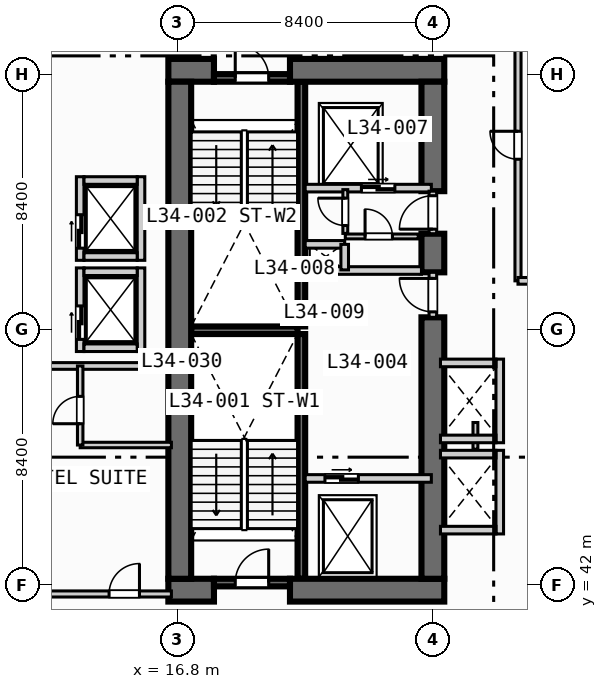
"""IFC4 building model, lengths in metres.
Left out: names, types, materials, properties, quantities, classifications, styles, units other than length and angle.
Written with IfcOpenShell. Run it as: python <this file> out.ifc"""

import sys

from ifc_helpers import new_model, si_unit, direction, frame, frame_2d, origin, place, context, subcontext, project, spatial, rectangle, extrude, element, fill, save


model = new_model("IFC4")
c1 = context("Model", 3, precision=1e-05, world=origin(), true_north=direction((0.0, 1.0)))
c2 = subcontext(c1, "Body", "Model", "MODEL_VIEW")
j1 = project(units=[si_unit("LENGTHUNIT", "METRE"), si_unit("PLANEANGLEUNIT", "RADIAN")], contexts=[c1])
p1 = place(None, origin())
s1 = spatial("IfcSite", under=j1, at=p1, CompositionType="ELEMENT")
p2 = place(p1, origin())
s2 = spatial("IfcBuilding", under=s1, at=p2, CompositionType="ELEMENT")
p3 = place(p2, frame((0.0, 0.0, 141.8)))
s3 = spatial("IfcBuildingStorey", under=s2, at=p3, CompositionType="ELEMENT", Elevation=141.8)
for number, where, z_axis, x_axis in (
    (1, (20.875, 42.2, 0.0), (0.0, 0.0, 1.0), (0.0, 1.0, 0.0)),
    (2, (20.875, 50.5, 0.0), (0.0, 0.0, 1.0), (0.0, 1.0, 0.0)),
):
    element("IfcWall", number, at=place(p3, frame(where, z_axis=z_axis, x_axis=x_axis)), inside=s3, PredefinedType="SOLIDWALL", context=c2, shape_type="SweptSolid", body=[
        extrude(rectangle(XDim=8.05, YDim=0.25, at=frame_2d((4.025, 0.0))), origin(), (0.0, 0.0, 1.0), 3.55),
    ])
p4 = place(p3, frame((17.25, 50.375, 0.0), z_axis=(0.0, 0.0, 1.0), x_axis=(1.0, 0.0, 0.0)))
e3 = element("IfcWall", 3, at=p4, inside=s3, PredefinedType="SOLIDWALL", context=c2, shape_type="SweptSolid", body=[
    extrude(rectangle(XDim=3.5, YDim=0.25, at=frame_2d((1.75, 0.0))), origin(), (0.0, 0.0, 1.0), 3.55),
])
p5 = place(p3, frame((16.5, 41.825, 0.0), z_axis=(0.0, 0.0, 1.0), x_axis=(1.0, 0.0, 0.0)))
e4 = element("IfcWall", 4, at=p5, inside=s3, PredefinedType="SHEAR", context=c2, shape_type="SweptSolid", body=[
    extrude(rectangle(XDim=1.5, YDim=0.75, at=frame_2d((0.75, 0.0))), origin(), (0.0, 0.0, 1.0), 3.55),
])
p6 = place(p3, frame((20.5, 41.825, 0.0), z_axis=(0.0, 0.0, 1.0), x_axis=(1.0, 0.0, 0.0)))
e5 = element("IfcWall", 5, at=p6, inside=s3, PredefinedType="SHEAR", context=c2, shape_type="SweptSolid", body=[
    extrude(rectangle(XDim=5.075, YDim=0.75, at=frame_2d((2.538, 0.0))), origin(), (0.0, 0.0, 1.0), 3.55),
])
p7 = place(p3, frame((16.5, 58.925, 0.0), z_axis=(0.0, 0.0, 1.0), x_axis=(1.0, 0.0, 0.0)))
e6 = element("IfcWall", 6, at=p7, inside=s3, PredefinedType="SHEAR", context=c2, shape_type="SweptSolid", body=[
    extrude(rectangle(XDim=1.5, YDim=0.75, at=frame_2d((0.75, 0.0))), origin(), (0.0, 0.0, 1.0), 3.55),
])
p8 = place(p3, frame((20.5, 58.925, 0.0), z_axis=(0.0, 0.0, 1.0), x_axis=(1.0, 0.0, 0.0)))
e7 = element("IfcWall", 7, at=p8, inside=s3, PredefinedType="SHEAR", context=c2, shape_type="SweptSolid", body=[
    extrude(rectangle(XDim=5.075, YDim=0.75, at=frame_2d((2.538, 0.0))), origin(), (0.0, 0.0, 1.0), 3.55),
])
p9 = place(p3, frame((16.875, 42.2, 0.0), z_axis=(0.0, 0.0, 1.0), x_axis=(0.0, 1.0, 0.0)))
e8 = element("IfcWall", 8, at=p9, inside=s3, PredefinedType="SHEAR", context=c2, shape_type="SweptSolid", body=[
    extrude(rectangle(XDim=16.35, YDim=0.75, at=frame_2d((8.175, 0.0))), origin(), (0.0, 0.0, 1.0), 3.55),
])
p10 = place(p3, frame((25.2, 42.2, 0.0), z_axis=(0.0, 0.0, 1.0), x_axis=(0.0, 1.0, 0.0)))
e9 = element("IfcWall", 9, at=p10, inside=s3, PredefinedType="SHEAR", context=c2, shape_type="SweptSolid", body=[
    extrude(rectangle(XDim=8.6, YDim=0.75, at=frame_2d((4.3, 0.0))), origin(), (0.0, 0.0, 1.0), 3.55),
])
p11 = place(p3, frame((25.2, 52.28, 0.0), z_axis=(0.0, 0.0, 1.0), x_axis=(0.0, 1.0, 0.0)))
e10 = element("IfcWall", 10, at=p11, inside=s3, PredefinedType="SHEAR", context=c2, shape_type="SweptSolid", body=[
    extrude(rectangle(XDim=1.27, YDim=0.75, at=frame_2d((0.635, 0.0))), origin(), (0.0, 0.0, 1.0), 3.55),
])
p12 = place(p3, frame((25.2, 54.95, 0.0), z_axis=(0.0, 0.0, 1.0), x_axis=(0.0, 1.0, 0.0)))
e11 = element("IfcWall", 11, at=p12, inside=s3, PredefinedType="SHEAR", context=c2, shape_type="SweptSolid", body=[
    extrude(rectangle(XDim=3.6, YDim=0.75, at=frame_2d((1.8, 0.0))), origin(), (0.0, 0.0, 1.0), 3.55),
])
p13 = place(p3, frame((18.0, 42.075, 0.0), z_axis=(0.0, 0.0, 1.0), x_axis=(1.0, 0.0, 0.0)))
e12 = element("IfcWall", 12, at=p13, inside=s3, PredefinedType="SOLIDWALL", context=c2, shape_type="SweptSolid", body=[
    extrude(rectangle(XDim=2.5, YDim=0.25, at=frame_2d((1.25, 0.0))), origin(), (0.0, 0.0, 1.0), 3.55),
])
p14 = place(p13, frame((0.7, 0.0, 0.0)))
e13 = element("IfcOpeningElement", 13, at=p14, cuts=e12, PredefinedType="OPENING", context=c2, shape_type="SweptSolid", body=[
    extrude(rectangle(XDim=1.1, YDim=2.15, at=frame_2d((0.55, 1.075))), frame((0.0, 0.135, 0.0), z_axis=(0.0, -1.0, 0.0), x_axis=(1.0, 0.0, 0.0)), (0.0, 0.0, 1.0), 0.27),
])
p15 = place(p3, frame((18.0, 58.675, 0.0), z_axis=(0.0, 0.0, 1.0), x_axis=(1.0, 0.0, 0.0)))
e14 = element("IfcWall", 14, at=p15, inside=s3, PredefinedType="SOLIDWALL", context=c2, shape_type="SweptSolid", body=[
    extrude(rectangle(XDim=2.5, YDim=0.25, at=frame_2d((1.25, 0.0))), origin(), (0.0, 0.0, 1.0), 3.55),
])
p16 = place(p15, frame((0.7, 0.0, 0.0)))
e15 = element("IfcOpeningElement", 15, at=p16, cuts=e14, PredefinedType="OPENING", context=c2, shape_type="SweptSolid", body=[
    extrude(rectangle(XDim=1.1, YDim=2.15, at=frame_2d((0.55, 1.075))), frame((0.0, 0.135, 0.0), z_axis=(0.0, -1.0, 0.0), x_axis=(1.0, 0.0, 0.0)), (0.0, 0.0, 1.0), 0.27),
])
p17 = place(p3, frame((21.0, 45.5, 0.0), z_axis=(0.0, 0.0, 1.0), x_axis=(1.0, 0.0, 0.0)))
e16 = element("IfcWall", 16, at=p17, inside=s3, PredefinedType="SOLIDWALL", context=c2, shape_type="SweptSolid", body=[
    extrude(rectangle(XDim=4.15, YDim=0.25, at=frame_2d((2.075, 0.0))), origin(), (0.0, 0.0, 1.0), 3.55),
])
p18 = place(p17, frame((0.65, 0.0, 0.0)))
e17 = element("IfcOpeningElement", 17, at=p18, cuts=e16, PredefinedType="OPENING", context=c2, shape_type="SweptSolid", body=[
    extrude(rectangle(XDim=1.1, YDim=2.15, at=frame_2d((0.55, 1.075))), frame((0.0, 0.135, 0.0), z_axis=(0.0, -1.0, 0.0), x_axis=(1.0, 0.0, 0.0)), (0.0, 0.0, 1.0), 0.27),
])
p19 = place(p3, frame((25.2, 50.8, 0.0), z_axis=(0.0, 0.0, 1.0), x_axis=(0.0, 1.0, 0.0)))
e18 = element("IfcWall", 18, at=p19, inside=s3, PredefinedType="SOLIDWALL", context=c2, shape_type="SweptSolid", body=[
    extrude(rectangle(XDim=1.48, YDim=0.25, at=frame_2d((0.74, 0.0))), origin(), (0.0, 0.0, 1.0), 3.55),
])
p20 = place(p19, frame((0.18, 0.0, 0.0)))
e19 = element("IfcOpeningElement", 19, at=p20, cuts=e18, PredefinedType="OPENING", context=c2, shape_type="SweptSolid", body=[
    extrude(rectangle(XDim=1.1, YDim=2.15, at=frame_2d((0.55, 1.075))), frame((0.0, 0.135, 0.0), z_axis=(0.0, -1.0, 0.0), x_axis=(1.0, 0.0, 0.0)), (0.0, 0.0, 1.0), 0.27),
])
p21 = place(p3, frame((21.0, 52.34, 0.0), z_axis=(0.0, 0.0, 1.0), x_axis=(1.0, 0.0, 0.0)))
e20 = element("IfcWall", 20, at=p21, inside=s3, PredefinedType="SOLIDWALL", context=c2, shape_type="SweptSolid", body=[
    extrude(rectangle(XDim=3.825, YDim=0.25, at=frame_2d((1.913, 0.0))), origin(), (0.0, 0.0, 1.0), 3.55),
])
p22 = place(p3, frame((21.0, 55.05, 0.0), z_axis=(0.0, 0.0, 1.0), x_axis=(1.0, 0.0, 0.0)))
e21 = element("IfcWall", 21, at=p22, inside=s3, PredefinedType="SOLIDWALL", context=c2, shape_type="SweptSolid", body=[
    extrude(rectangle(XDim=4.15, YDim=0.25, at=frame_2d((2.075, 0.0))), origin(), (0.0, 0.0, 1.0), 3.55),
])
p23 = place(p22, frame((1.85, 0.0, 0.0)))
e22 = element("IfcOpeningElement", 22, at=p23, cuts=e21, PredefinedType="OPENING", context=c2, shape_type="SweptSolid", body=[
    extrude(rectangle(XDim=1.1, YDim=2.15, at=frame_2d((0.55, 1.075))), frame((0.0, 0.135, 0.0), z_axis=(0.0, -1.0, 0.0), x_axis=(1.0, 0.0, 0.0)), (0.0, 0.0, 1.0), 0.27),
])
p24 = place(p3, frame((25.2, 53.55, 0.0), z_axis=(0.0, 0.0, 1.0), x_axis=(0.0, 1.0, 0.0)))
e23 = element("IfcWall", 23, at=p24, inside=s3, PredefinedType="SOLIDWALL", context=c2, shape_type="SweptSolid", body=[
    extrude(rectangle(XDim=1.4, YDim=0.25, at=frame_2d((0.7, 0.0))), origin(), (0.0, 0.0, 1.0), 3.55),
])
p25 = place(p24, frame((0.15, 0.0, 0.0)))
e24 = element("IfcOpeningElement", 24, at=p25, cuts=e23, PredefinedType="OPENING", context=c2, shape_type="SweptSolid", body=[
    extrude(rectangle(XDim=1.1, YDim=2.15, at=frame_2d((0.55, 1.075))), frame((0.0, 0.135, 0.0), z_axis=(0.0, -1.0, 0.0), x_axis=(1.0, 0.0, 0.0)), (0.0, 0.0, 1.0), 0.27),
])
p26 = place(p3, frame((21.0, 53.2, 0.0), z_axis=(0.0, 0.0, 1.0), x_axis=(1.0, 0.0, 0.0)))
e25 = element("IfcWall", 25, at=p26, inside=s3, PredefinedType="SOLIDWALL", context=c2, shape_type="SweptSolid", body=[
    extrude(rectangle(XDim=1.3, YDim=0.25, at=frame_2d((0.65, 0.0))), origin(), (0.0, 0.0, 1.0), 3.55),
])
p27 = place(p3, frame((22.3, 52.36, 0.0), z_axis=(0.0, 0.0, 1.0), x_axis=(0.0, 1.0, 0.0)))
e26 = element("IfcWall", 26, at=p27, inside=s3, PredefinedType="SOLIDWALL", context=c2, shape_type="SweptSolid", body=[
    extrude(rectangle(XDim=0.84, YDim=0.25, at=frame_2d((0.42, 0.0))), origin(), (0.0, 0.0, 1.0), 3.55),
])
p28 = place(p3, frame((22.32, 53.56, 0.0), z_axis=(0.0, 0.0, 1.0), x_axis=(0.0, 1.0, 0.0)))
e27 = element("IfcWall", 27, at=p28, inside=s3, PredefinedType="PARTITIONING", context=c2, shape_type="SweptSolid", body=[
    extrude(rectangle(XDim=1.44, YDim=0.16, at=frame_2d((0.72, 0.0))), origin(), (0.0, 0.0, 1.0), 3.55),
])
p29 = place(p28, frame((0.26, 0.0, 0.0)))
e28 = element("IfcOpeningElement", 28, at=p29, cuts=e27, PredefinedType="OPENING", context=c2, shape_type="SweptSolid", body=[
    extrude(rectangle(XDim=0.9, YDim=2.1, at=frame_2d((0.45, 1.05))), frame((0.0, 0.09, 0.0), z_axis=(0.0, -1.0, 0.0), x_axis=(1.0, 0.0, 0.0)), (0.0, 0.0, 1.0), 0.18),
])
p30 = place(p3, frame((22.32, 53.46, 0.0), z_axis=(0.0, 0.0, 1.0), x_axis=(1.0, 0.0, 0.0)))
e29 = element("IfcWall", 29, at=p30, inside=s3, PredefinedType="PARTITIONING", context=c2, shape_type="SweptSolid", body=[
    extrude(rectangle(XDim=2.4, YDim=0.16, at=frame_2d((1.2, 0.0))), origin(), (0.0, 0.0, 1.0), 3.55),
])
p31 = place(p30, frame((0.65, 0.0, 0.0)))
e30 = element("IfcOpeningElement", 30, at=p31, cuts=e29, PredefinedType="OPENING", context=c2, shape_type="SweptSolid", body=[
    extrude(rectangle(XDim=0.9, YDim=2.1, at=frame_2d((0.45, 1.05))), frame((0.0, 0.09, 0.0), z_axis=(0.0, -1.0, 0.0), x_axis=(1.0, 0.0, 0.0)), (0.0, 0.0, 1.0), 0.18),
])
p32 = place(p3, frame((13.6, 49.675, 0.0), z_axis=(0.0, 0.0, 1.0), x_axis=(0.0, 1.0, 0.0)))
e31 = element("IfcWall", 31, at=p32, inside=s3, PredefinedType="SOLIDWALL", context=c2, shape_type="SweptSolid", body=[
    extrude(rectangle(XDim=2.75, YDim=0.25, at=frame_2d((1.375, 0.0))), origin(), (0.0, 0.0, 1.0), 3.55),
])
p33 = place(p32, frame((0.4, 0.0, 0.0)))
e32 = element("IfcOpeningElement", 32, at=p33, cuts=e31, PredefinedType="OPENING", context=c2, shape_type="SweptSolid", body=[
    extrude(rectangle(XDim=1.1, YDim=2.15, at=frame_2d((0.55, 1.075))), frame((0.0, 0.135, 0.0), z_axis=(0.0, -1.0, 0.0), x_axis=(1.0, 0.0, 0.0)), (0.0, 0.0, 1.0), 0.27),
])
p34 = place(p3, frame((15.6, 49.675, 0.0), z_axis=(0.0, 0.0, 1.0), x_axis=(0.0, 1.0, 0.0)))
e33 = element("IfcWall", 33, at=p34, inside=s3, PredefinedType="SOLIDWALL", context=c2, shape_type="SweptSolid", body=[
    extrude(rectangle(XDim=2.75, YDim=0.25, at=frame_2d((1.375, 0.0))), origin(), (0.0, 0.0, 1.0), 3.55),
])
for number, where, z_axis, x_axis in (
    (34, (13.725, 49.8, 0.0), (0.0, 0.0, 1.0), (1.0, 0.0, 0.0)),
    (35, (13.725, 52.3, 0.0), (0.0, 0.0, 1.0), (1.0, 0.0, 0.0)),
):
    element("IfcWall", number, at=place(p3, frame(where, z_axis=z_axis, x_axis=x_axis)), inside=s3, PredefinedType="SOLIDWALL", context=c2, shape_type="SweptSolid", body=[
        extrude(rectangle(XDim=1.75, YDim=0.25, at=frame_2d((0.875, 0.0))), origin(), (0.0, 0.0, 1.0), 3.55),
    ])
p35 = place(p3, frame((13.6, 52.675, 0.0), z_axis=(0.0, 0.0, 1.0), x_axis=(0.0, 1.0, 0.0)))
e36 = element("IfcWall", 36, at=p35, inside=s3, PredefinedType="SOLIDWALL", context=c2, shape_type="SweptSolid", body=[
    extrude(rectangle(XDim=2.75, YDim=0.25, at=frame_2d((1.375, 0.0))), origin(), (0.0, 0.0, 1.0), 3.55),
])
p36 = place(p35, frame((0.4, 0.0, 0.0)))
e37 = element("IfcOpeningElement", 37, at=p36, cuts=e36, PredefinedType="OPENING", context=c2, shape_type="SweptSolid", body=[
    extrude(rectangle(XDim=1.1, YDim=2.15, at=frame_2d((0.55, 1.075))), frame((0.0, 0.135, 0.0), z_axis=(0.0, -1.0, 0.0), x_axis=(1.0, 0.0, 0.0)), (0.0, 0.0, 1.0), 0.27),
])
p37 = place(p3, frame((15.6, 52.675, 0.0), z_axis=(0.0, 0.0, 1.0), x_axis=(0.0, 1.0, 0.0)))
e38 = element("IfcWall", 38, at=p37, inside=s3, PredefinedType="SOLIDWALL", context=c2, shape_type="SweptSolid", body=[
    extrude(rectangle(XDim=2.75, YDim=0.25, at=frame_2d((1.375, 0.0))), origin(), (0.0, 0.0, 1.0), 3.55),
])
for number, where, z_axis, x_axis in (
    (39, (13.725, 52.8, 0.0), (0.0, 0.0, 1.0), (1.0, 0.0, 0.0)),
    (40, (13.725, 55.3, 0.0), (0.0, 0.0, 1.0), (1.0, 0.0, 0.0)),
):
    element("IfcWall", number, at=place(p3, frame(where, z_axis=z_axis, x_axis=x_axis)), inside=s3, PredefinedType="SOLIDWALL", context=c2, shape_type="SweptSolid", body=[
        extrude(rectangle(XDim=1.75, YDim=0.25, at=frame_2d((0.875, 0.0))), origin(), (0.0, 0.0, 1.0), 3.55),
    ])
p38 = place(p3, frame((27.4, 43.675, 0.0), z_axis=(0.0, 0.0, 1.0), x_axis=(0.0, 1.0, 0.0)))
e41 = element("IfcWall", 41, at=p38, inside=s3, PredefinedType="SOLIDWALL", context=c2, shape_type="SweptSolid", body=[
    extrude(rectangle(XDim=2.75, YDim=0.25, at=frame_2d((1.375, 0.0))), origin(), (0.0, 0.0, 1.0), 3.55),
])
for number, where, z_axis, x_axis in (
    (42, (25.45, 43.8, 0.0), (0.0, 0.0, 1.0), (1.0, 0.0, 0.0)),
    (43, (25.45, 46.3, 0.0), (0.0, 0.0, 1.0), (1.0, 0.0, 0.0)),
):
    element("IfcWall", number, at=place(p3, frame(where, z_axis=z_axis, x_axis=x_axis)), inside=s3, PredefinedType="SOLIDWALL", context=c2, shape_type="SweptSolid", body=[
        extrude(rectangle(XDim=1.825, YDim=0.25, at=frame_2d((0.913, 0.0))), origin(), (0.0, 0.0, 1.0), 3.55),
    ])
p39 = place(p3, frame((26.6, 46.46, 0.0), z_axis=(0.0, 0.0, 1.0), x_axis=(0.0, 1.0, 0.0)))
e44 = element("IfcWall", 44, at=p39, inside=s3, PredefinedType="PARTITIONING", context=c2, shape_type="SweptSolid", body=[
    extrude(rectangle(XDim=0.88, YDim=0.16, at=frame_2d((0.44, 0.0))), origin(), (0.0, 0.0, 1.0), 3.55),
])
p40 = place(p3, frame((27.4, 46.675, 0.0), z_axis=(0.0, 0.0, 1.0), x_axis=(0.0, 1.0, 0.0)))
e45 = element("IfcWall", 45, at=p40, inside=s3, PredefinedType="SOLIDWALL", context=c2, shape_type="SweptSolid", body=[
    extrude(rectangle(XDim=2.75, YDim=0.25, at=frame_2d((1.375, 0.0))), origin(), (0.0, 0.0, 1.0), 3.55),
])
for number, where, z_axis, x_axis in (
    (46, (25.45, 46.8, 0.0), (0.0, 0.0, 1.0), (1.0, 0.0, 0.0)),
    (47, (25.45, 49.3, 0.0), (0.0, 0.0, 1.0), (1.0, 0.0, 0.0)),
):
    element("IfcWall", number, at=place(p3, frame(where, z_axis=z_axis, x_axis=x_axis)), inside=s3, PredefinedType="SOLIDWALL", context=c2, shape_type="SweptSolid", body=[
        extrude(rectangle(XDim=1.825, YDim=0.25, at=frame_2d((0.913, 0.0))), origin(), (0.0, 0.0, 1.0), 3.55),
    ])
p41 = place(p3, frame((0.35, 41.7, 0.0), z_axis=(0.0, 0.0, 1.0), x_axis=(1.0, 0.0, 0.0)))
e48 = element("IfcWall", 48, at=p41, inside=s3, PredefinedType="PARTITIONING", context=c2, shape_type="SweptSolid", body=[
    extrude(rectangle(XDim=16.25, YDim=0.2, at=frame_2d((8.125, 0.0))), origin(), (0.0, 0.0, 1.0), 2.8),
])
p42 = place(p41, frame((14.2, 0.0, 0.0)))
e49 = element("IfcOpeningElement", 49, at=p42, cuts=e48, PredefinedType="OPENING", context=c2, shape_type="SweptSolid", body=[
    extrude(rectangle(XDim=1.0, YDim=2.15, at=frame_2d((0.5, 1.075))), frame((0.0, 0.11, 0.0), z_axis=(0.0, -1.0, 0.0), x_axis=(1.0, 0.0, 0.0)), (0.0, 0.0, 1.0), 0.22),
])
p43 = place(p3, frame((0.35, 49.2, 0.0), z_axis=(0.0, 0.0, 1.0), x_axis=(1.0, 0.0, 0.0)))
e50 = element("IfcWall", 50, at=p43, inside=s3, PredefinedType="PARTITIONING", context=c2, shape_type="SweptSolid", body=[
    extrude(rectangle(XDim=16.25, YDim=0.22, at=frame_2d((8.125, 0.0))), origin(), (0.0, 0.0, 1.0), 3.55),
])
p44 = place(p3, frame((13.6, 46.6, 0.0), z_axis=(0.0, 0.0, 1.0), x_axis=(1.0, 0.0, 0.0)))
e51 = element("IfcWall", 51, at=p44, inside=s3, PredefinedType="PLUMBINGWALL", context=c2, shape_type="SweptSolid", body=[
    extrude(rectangle(XDim=3.0, YDim=0.18, at=frame_2d((1.5, 0.0))), origin(), (0.0, 0.0, 1.0), 3.55),
])
p45 = place(p3, frame((13.6, 46.6, 0.0), z_axis=(0.0, 0.0, 1.0), x_axis=(0.0, 1.0, 0.0)))
e52 = element("IfcWall", 52, at=p45, inside=s3, PredefinedType="PLUMBINGWALL", context=c2, shape_type="SweptSolid", body=[
    extrude(rectangle(XDim=2.6, YDim=0.18, at=frame_2d((1.3, 0.0))), origin(), (0.0, 0.0, 1.0), 3.55),
])
p46 = place(p45, frame((0.7, 0.0, 0.0)))
e53 = element("IfcOpeningElement", 53, at=p46, cuts=e52, PredefinedType="OPENING", context=c2, shape_type="SweptSolid", body=[
    extrude(rectangle(XDim=0.9, YDim=2.1, at=frame_2d((0.45, 1.05))), frame((0.0, 0.1, 0.0), z_axis=(0.0, -1.0, 0.0), x_axis=(1.0, 0.0, 0.0)), (0.0, 0.0, 1.0), 0.2),
])
p47 = place(p3, frame((28.0, 52.0, 0.0), z_axis=(0.0, 0.0, 1.0), x_axis=(0.0, 1.0, 0.0)))
e54 = element("IfcWall", 54, at=p47, inside=s3, PredefinedType="PARTITIONING", context=c2, shape_type="SweptSolid", body=[
    extrude(rectangle(XDim=37.0, YDim=0.2, at=frame_2d((18.5, 0.0))), origin(), (0.0, 0.0, 1.0), 3.55),
])
p48 = place(p47, frame((4.0, 0.0, 0.0)))
e55 = element("IfcOpeningElement", 55, at=p48, cuts=e54, PredefinedType="OPENING", context=c2, shape_type="SweptSolid", body=[
    extrude(rectangle(XDim=0.92, YDim=2.1, at=frame_2d((0.46, 1.05))), frame((0.0, 0.11, 0.0), z_axis=(0.0, -1.0, 0.0), x_axis=(1.0, 0.0, 0.0)), (0.0, 0.0, 1.0), 0.22),
])
p49 = place(p3, frame((28.0, 52.0, 0.0), z_axis=(0.0, 0.0, 1.0), x_axis=(1.0, 0.0, 0.0)))
e56 = element("IfcWall", 56, at=p49, inside=s3, PredefinedType="PARTITIONING", context=c2, shape_type="SweptSolid", body=[
    extrude(rectangle(XDim=5.3, YDim=0.22, at=frame_2d((2.65, 0.0))), origin(), (0.0, 0.0, 1.0), 3.55),
])
p50 = place(p14, origin())
e57 = element("IfcDoor", 57, at=p50, inside=s3, OperationType="SINGLE_SWING_RIGHT", PredefinedType="DOOR", context=c2, shape_type="SweptSolid", body=[
    extrude(rectangle(XDim=1.1, YDim=2.15, at=frame_2d((0.55, 1.075))), frame((0.0, 0.025, 0.0), z_axis=(0.0, -1.0, 0.0), x_axis=(1.0, 0.0, 0.0)), (0.0, 0.0, 1.0), 0.05),
])
fill(e13, e57)
p51 = place(p16, origin())
e58 = element("IfcDoor", 58, at=p51, inside=s3, OperationType="SINGLE_SWING_LEFT", PredefinedType="DOOR", context=c2, shape_type="SweptSolid", body=[
    extrude(rectangle(XDim=1.1, YDim=2.15, at=frame_2d((0.55, 1.075))), frame((0.0, 0.025, 0.0), z_axis=(0.0, -1.0, 0.0), x_axis=(1.0, 0.0, 0.0)), (0.0, 0.0, 1.0), 0.05),
])
fill(e15, e58)
p52 = place(p18, origin())
e59 = element("IfcDoor", 59, at=p52, inside=s3, OperationType="SLIDING_TO_LEFT", PredefinedType="DOOR", context=c2, shape_type="SweptSolid", body=[
    extrude(rectangle(XDim=1.1, YDim=2.15, at=frame_2d((0.55, 1.075))), frame((0.0, 0.025, 0.0), z_axis=(0.0, -1.0, 0.0), x_axis=(1.0, 0.0, 0.0)), (0.0, 0.0, 1.0), 0.05),
])
fill(e17, e59)
p53 = place(p20, origin())
e60 = element("IfcDoor", 60, at=p53, inside=s3, OperationType="SINGLE_SWING_RIGHT", PredefinedType="DOOR", context=c2, shape_type="SweptSolid", body=[
    extrude(rectangle(XDim=1.1, YDim=2.15, at=frame_2d((0.55, 1.075))), frame((0.0, 0.025, 0.0), z_axis=(0.0, -1.0, 0.0), x_axis=(1.0, 0.0, 0.0)), (0.0, 0.0, 1.0), 0.05),
])
fill(e19, e60)
p54 = place(p23, origin())
e61 = element("IfcDoor", 61, at=p54, inside=s3, OperationType="SLIDING_TO_LEFT", PredefinedType="DOOR", context=c2, shape_type="SweptSolid", body=[
    extrude(rectangle(XDim=1.1, YDim=2.15, at=frame_2d((0.55, 1.075))), frame((0.0, 0.025, 0.0), z_axis=(0.0, -1.0, 0.0), x_axis=(1.0, 0.0, 0.0)), (0.0, 0.0, 1.0), 0.05),
])
fill(e22, e61)
p55 = place(p25, origin())
e62 = element("IfcDoor", 62, at=p55, inside=s3, OperationType="SINGLE_SWING_LEFT", PredefinedType="DOOR", context=c2, shape_type="SweptSolid", body=[
    extrude(rectangle(XDim=1.1, YDim=2.15, at=frame_2d((0.55, 1.075))), frame((0.0, 0.025, 0.0), z_axis=(0.0, -1.0, 0.0), x_axis=(1.0, 0.0, 0.0)), (0.0, 0.0, 1.0), 0.05),
])
fill(e24, e62)
p56 = place(p29, origin())
e63 = element("IfcDoor", 63, at=p56, inside=s3, OperationType="SINGLE_SWING_RIGHT", PredefinedType="DOOR", context=c2, shape_type="SweptSolid", body=[
    extrude(rectangle(XDim=0.9, YDim=2.1, at=frame_2d((0.45, 1.05))), frame((0.0, 0.025, 0.0), z_axis=(0.0, -1.0, 0.0), x_axis=(1.0, 0.0, 0.0)), (0.0, 0.0, 1.0), 0.05),
])
fill(e28, e63)
p57 = place(p31, origin())
e64 = element("IfcDoor", 64, at=p57, inside=s3, OperationType="SINGLE_SWING_LEFT", PredefinedType="DOOR", context=c2, shape_type="SweptSolid", body=[
    extrude(rectangle(XDim=0.9, YDim=2.1, at=frame_2d((0.45, 1.05))), frame((0.0, 0.025, 0.0), z_axis=(0.0, -1.0, 0.0), x_axis=(1.0, 0.0, 0.0)), (0.0, 0.0, 1.0), 0.05),
])
fill(e30, e64)
p58 = place(p33, origin())
e65 = element("IfcDoor", 65, at=p58, inside=s3, OperationType="SLIDING_TO_LEFT", PredefinedType="DOOR", context=c2, shape_type="SweptSolid", body=[
    extrude(rectangle(XDim=1.1, YDim=2.15, at=frame_2d((0.55, 1.075))), frame((0.0, 0.025, 0.0), z_axis=(0.0, -1.0, 0.0), x_axis=(1.0, 0.0, 0.0)), (0.0, 0.0, 1.0), 0.05),
])
fill(e32, e65)
p59 = place(p36, origin())
e66 = element("IfcDoor", 66, at=p59, inside=s3, OperationType="SLIDING_TO_LEFT", PredefinedType="DOOR", context=c2, shape_type="SweptSolid", body=[
    extrude(rectangle(XDim=1.1, YDim=2.15, at=frame_2d((0.55, 1.075))), frame((0.0, 0.025, 0.0), z_axis=(0.0, -1.0, 0.0), x_axis=(1.0, 0.0, 0.0)), (0.0, 0.0, 1.0), 0.05),
])
fill(e37, e66)
p60 = place(p42, origin())
e67 = element("IfcDoor", 67, at=p60, inside=s3, OperationType="SINGLE_SWING_RIGHT", PredefinedType="DOOR", context=c2, shape_type="SweptSolid", body=[
    extrude(rectangle(XDim=1.0, YDim=2.15, at=frame_2d((0.5, 1.075))), frame((0.0, 0.025, 0.0), z_axis=(0.0, -1.0, 0.0), x_axis=(1.0, 0.0, 0.0)), (0.0, 0.0, 1.0), 0.05),
])
fill(e49, e67)
p61 = place(p46, origin())
e68 = element("IfcDoor", 68, at=p61, inside=s3, OperationType="SINGLE_SWING_LEFT", PredefinedType="DOOR", context=c2, shape_type="SweptSolid", body=[
    extrude(rectangle(XDim=0.9, YDim=2.1, at=frame_2d((0.45, 1.05))), frame((0.0, 0.025, 0.0), z_axis=(0.0, -1.0, 0.0), x_axis=(1.0, 0.0, 0.0)), (0.0, 0.0, 1.0), 0.05),
])
fill(e53, e68)
p62 = place(p48, origin())
e69 = element("IfcDoor", 69, at=p62, inside=s3, OperationType="SINGLE_SWING_RIGHT", PredefinedType="DOOR", context=c2, shape_type="SweptSolid", body=[
    extrude(rectangle(XDim=0.92, YDim=2.1, at=frame_2d((0.46, 1.05))), frame((0.0, 0.025, 0.0), z_axis=(0.0, -1.0, 0.0), x_axis=(1.0, 0.0, 0.0)), (0.0, 0.0, 1.0), 0.05),
])
fill(e55, e69)
save(model, sys.argv[1])
